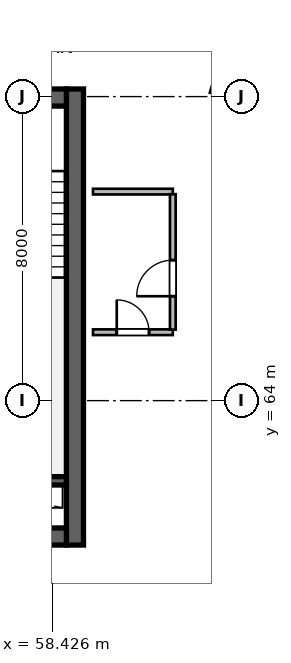
"""IFC4 building model, lengths in metres.
Left out: names, types, materials, properties, quantities, classifications, styles, units other than length and angle.
Written with IfcOpenShell. Run it as: python <this file> out.ifc"""

import sys

from ifc_helpers import new_model, si_unit, direction, frame, frame_2d, origin, place, context, subcontext, project, spatial, rectangle, extrude, source, transform, mapped, element, fill, save


model = new_model("IFC4")
c1 = context("Model", 3, precision=1e-05, world=origin(), true_north=direction((0.0, 1.0)))
c2 = subcontext(c1, "Body", "Model", "MODEL_VIEW")
j1 = project(units=[si_unit("LENGTHUNIT", "METRE"), si_unit("PLANEANGLEUNIT", "RADIAN")], contexts=[c1])
p1 = place(None, origin())
s1 = spatial("IfcSite", under=j1, at=p1, CompositionType="ELEMENT")
p2 = place(p1, origin())
s2 = spatial("IfcBuilding", under=s1, at=p2, CompositionType="ELEMENT")
p3 = place(p2, frame((0.0, 0.0, 207.9)))
s3 = spatial("IfcBuildingStorey", under=s2, at=p3, CompositionType="ELEMENT", Elevation=207.9)
m1 = source(origin(), c2, "Body", "SweptSolid", [
    extrude(rectangle(XDim=12.0, YDim=0.45, at=frame_2d((6.0, 0.0))), origin(), (0.0, 0.0, 1.0), 3.9),
])
p4 = place(p3, frame((59.025, 60.2, 0.0), z_axis=(0.0, 0.0, 1.0), x_axis=(0.0, 1.0, 0.0)))
e1 = element("IfcWall", 1, at=p4, inside=s3, PredefinedType="SHEAR", context=c2, shape_type="MappedRepresentation", body=[
    mapped(m1, transform((0.0, 0.0, 0.0), scale=1.0)),
])
m2 = source(origin(), c2, "Body", "SweptSolid", [
    extrude(rectangle(XDim=21.6, YDim=0.45, at=frame_2d((10.8, 0.0))), origin(), (0.0, 0.0, 1.0), 3.9),
])
p5 = place(p3, frame((37.2, 60.425, 0.0), z_axis=(0.0, 0.0, 1.0), x_axis=(1.0, 0.0, 0.0)))
e2 = element("IfcWall", 2, at=p5, inside=s3, PredefinedType="SHEAR", context=c2, shape_type="MappedRepresentation", body=[
    mapped(m2, transform((0.0, 0.0, 0.0), scale=1.0)),
])
p6 = place(p5, frame((1.1, 0.0, 0.0)))
e3 = element("IfcOpeningElement", 3, at=p6, cuts=e2, PredefinedType="OPENING", context=c2, shape_type="SweptSolid", body=[
    extrude(rectangle(XDim=1.15, YDim=2.15, at=frame_2d((0.575, 1.075))), frame((0.0, 0.235, 0.0), z_axis=(0.0, -1.0, 0.0), x_axis=(1.0, 0.0, 0.0)), (0.0, 0.0, 1.0), 0.47),
])
p7 = place(p5, frame((19.5, 0.0, 0.0)))
e4 = element("IfcOpeningElement", 4, at=p7, cuts=e2, PredefinedType="OPENING", context=c2, shape_type="SweptSolid", body=[
    extrude(rectangle(XDim=0.9, YDim=2.1, at=frame_2d((0.45, 1.05))), frame((0.0, 0.235, 0.0), z_axis=(0.0, -1.0, 0.0), x_axis=(1.0, 0.0, 0.0)), (0.0, 0.0, 1.0), 0.47),
])
p8 = place(p5, frame((12.02, 0.0, 0.0)))
e5 = element("IfcOpeningElement", 5, at=p8, cuts=e2, PredefinedType="OPENING", context=c2, shape_type="SweptSolid", body=[
    extrude(rectangle(XDim=1.6, YDim=2.15, at=frame_2d((0.8, 1.075))), frame((0.0, 0.235, 0.0), z_axis=(0.0, -1.0, 0.0), x_axis=(1.0, 0.0, 0.0)), (0.0, 0.0, 1.0), 0.47),
])
p9 = place(p3, frame((37.2, 71.975, 0.0), z_axis=(0.0, 0.0, 1.0), x_axis=(1.0, 0.0, 0.0)))
e6 = element("IfcWall", 6, at=p9, inside=s3, PredefinedType="SHEAR", context=c2, shape_type="MappedRepresentation", body=[
    mapped(m2, transform((0.0, 0.0, 0.0), scale=1.0)),
])
p10 = place(p9, frame((1.2, 0.0, 0.0)))
e7 = element("IfcOpeningElement", 7, at=p10, cuts=e6, PredefinedType="OPENING", context=c2, shape_type="SweptSolid", body=[
    extrude(rectangle(XDim=0.9, YDim=2.1, at=frame_2d((0.45, 1.05))), frame((0.0, 0.235, 0.0), z_axis=(0.0, -1.0, 0.0), x_axis=(1.0, 0.0, 0.0)), (0.0, 0.0, 1.0), 0.47),
])
p11 = place(p9, frame((14.7, 0.0, 0.0)))
e8 = element("IfcOpeningElement", 8, at=p11, cuts=e6, PredefinedType="OPENING", context=c2, shape_type="SweptSolid", body=[
    extrude(rectangle(XDim=1.2, YDim=2.15, at=frame_2d((0.6, 1.075))), frame((0.0, 0.235, 0.0), z_axis=(0.0, -1.0, 0.0), x_axis=(1.0, 0.0, 0.0)), (0.0, 0.0, 1.0), 0.47),
])
p12 = place(p9, frame((4.15, 0.0, 0.0)))
e9 = element("IfcOpeningElement", 9, at=p12, cuts=e6, PredefinedType="OPENING", context=c2, shape_type="SweptSolid", body=[
    extrude(rectangle(XDim=1.3, YDim=2.15, at=frame_2d((0.65, 1.075))), frame((0.0, 0.235, 0.0), z_axis=(0.0, -1.0, 0.0), x_axis=(1.0, 0.0, 0.0)), (0.0, 0.0, 1.0), 0.47),
])
p13 = place(p9, frame((6.76, 0.0, 0.0)))
e10 = element("IfcOpeningElement", 10, at=p13, cuts=e6, PredefinedType="OPENING", context=c2, shape_type="SweptSolid", body=[
    extrude(rectangle(XDim=0.85, YDim=2.1, at=frame_2d((0.425, 1.05))), frame((0.0, 0.235, 0.0), z_axis=(0.0, -1.0, 0.0), x_axis=(1.0, 0.0, 0.0)), (0.0, 0.0, 1.0), 0.47),
])
p14 = place(p9, frame((8.76, 0.0, 0.0)))
e11 = element("IfcOpeningElement", 11, at=p14, cuts=e6, PredefinedType="OPENING", context=c2, shape_type="SweptSolid", body=[
    extrude(rectangle(XDim=0.85, YDim=2.1, at=frame_2d((0.425, 1.05))), frame((0.0, 0.235, 0.0), z_axis=(0.0, -1.0, 0.0), x_axis=(1.0, 0.0, 0.0)), (0.0, 0.0, 1.0), 0.47),
])
p15 = place(p9, frame((10.725, 0.0, 0.0)))
e12 = element("IfcOpeningElement", 12, at=p15, cuts=e6, PredefinedType="OPENING", context=c2, shape_type="SweptSolid", body=[
    extrude(rectangle(XDim=0.85, YDim=2.1, at=frame_2d((0.425, 1.05))), frame((0.0, 0.235, 0.0), z_axis=(0.0, -1.0, 0.0), x_axis=(1.0, 0.0, 0.0)), (0.0, 0.0, 1.0), 0.47),
])
m3 = source(origin(), c2, "Body", "SweptSolid", [
    extrude(rectangle(XDim=3.27, YDim=0.22, at=frame_2d((1.635, 0.0))), origin(), (0.0, 0.0, 1.0), 3.9),
])
p16 = place(p3, frame((55.53, 61.89, 0.0), z_axis=(0.0, 0.0, 1.0), x_axis=(1.0, 0.0, 0.0)))
e13 = element("IfcWall", 13, at=p16, inside=s3, PredefinedType="SHEAR", context=c2, shape_type="MappedRepresentation", body=[
    mapped(m3, transform((0.0, 0.0, 0.0), scale=1.0)),
])
m4 = source(origin(), c2, "Body", "SweptSolid", [
    extrude(rectangle(XDim=2.1, YDim=0.15, at=frame_2d((1.05, 0.0))), origin(), (0.0, 0.0, 1.0), 3.64),
])
p17 = place(p3, frame((59.5, 65.8, 0.0), z_axis=(0.0, 0.0, 1.0), x_axis=(1.0, 0.0, 0.0)))
e14 = element("IfcWall", 14, at=p17, inside=s3, PredefinedType="PARTITIONING", context=c2, shape_type="MappedRepresentation", body=[
    mapped(m4, transform((0.0, 0.0, 0.0), scale=1.0)),
])
p18 = place(p17, frame((0.625, 0.0, 0.0)))
e15 = element("IfcOpeningElement", 15, at=p18, cuts=e14, PredefinedType="OPENING", context=c2, shape_type="SweptSolid", body=[
    extrude(rectangle(XDim=0.85, YDim=2.1, at=frame_2d((0.425, 1.05))), frame((0.0, 0.085, 0.0), z_axis=(0.0, -1.0, 0.0), x_axis=(1.0, 0.0, 0.0)), (0.0, 0.0, 1.0), 0.17),
])
p19 = place(p3, frame((59.5, 69.5, 0.0), z_axis=(0.0, 0.0, 1.0), x_axis=(1.0, 0.0, 0.0)))
e16 = element("IfcWall", 16, at=p19, inside=s3, PredefinedType="PARTITIONING", context=c2, shape_type="MappedRepresentation", body=[
    mapped(m4, transform((0.0, 0.0, 0.0), scale=1.0)),
])
m5 = source(origin(), c2, "Body", "SweptSolid", [
    extrude(rectangle(XDim=3.565, YDim=0.15, at=frame_2d((1.783, 0.0))), origin(), (0.0, 0.0, 1.0), 3.64),
])
p20 = place(p3, frame((61.6, 65.867, 0.0), z_axis=(0.0, 0.0, 1.0), x_axis=(0.0, 1.0, 0.0)))
e17 = element("IfcWall", 17, at=p20, inside=s3, PredefinedType="PARTITIONING", context=c2, shape_type="MappedRepresentation", body=[
    mapped(m5, transform((0.0, 0.0, 0.0), scale=1.0)),
])
p21 = place(p20, frame((0.88, 0.0, 0.0)))
e18 = element("IfcOpeningElement", 18, at=p21, cuts=e17, PredefinedType="OPENING", context=c2, shape_type="SweptSolid", body=[
    extrude(rectangle(XDim=0.95, YDim=2.1, at=frame_2d((0.475, 1.05))), frame((0.0, 0.085, 0.0), z_axis=(0.0, -1.0, 0.0), x_axis=(1.0, 0.0, 0.0)), (0.0, 0.0, 1.0), 0.17),
])
m6 = source(origin(), c2, "Body", "SweptSolid", [
    extrude(rectangle(XDim=0.85, YDim=2.1, at=frame_2d((0.425, 1.05))), frame((0.0, 0.025, 0.0), z_axis=(0.0, -1.0, 0.0), x_axis=(1.0, 0.0, 0.0)), (0.0, 0.0, 1.0), 0.05),
])
p22 = place(p18, origin())
e19 = element("IfcDoor", 19, at=p22, inside=s3, OperationType="SINGLE_SWING_LEFT", PredefinedType="DOOR", context=c2, shape_type="MappedRepresentation", body=[
    mapped(m6, transform((0.0, 0.0, 0.0), scale=1.0)),
])
fill(e15, e19)
m7 = source(origin(), c2, "Body", "SweptSolid", [
    extrude(rectangle(XDim=0.95, YDim=2.1, at=frame_2d((0.475, 1.05))), frame((0.0, 0.025, 0.0), z_axis=(0.0, -1.0, 0.0), x_axis=(1.0, 0.0, 0.0)), (0.0, 0.0, 1.0), 0.05),
])
p23 = place(p21, origin())
e20 = element("IfcDoor", 20, at=p23, inside=s3, OperationType="SINGLE_SWING_LEFT", PredefinedType="DOOR", context=c2, shape_type="MappedRepresentation", body=[
    mapped(m7, transform((0.0, 0.0, 0.0), scale=1.0)),
])
fill(e18, e20)
save(model, sys.argv[1])
